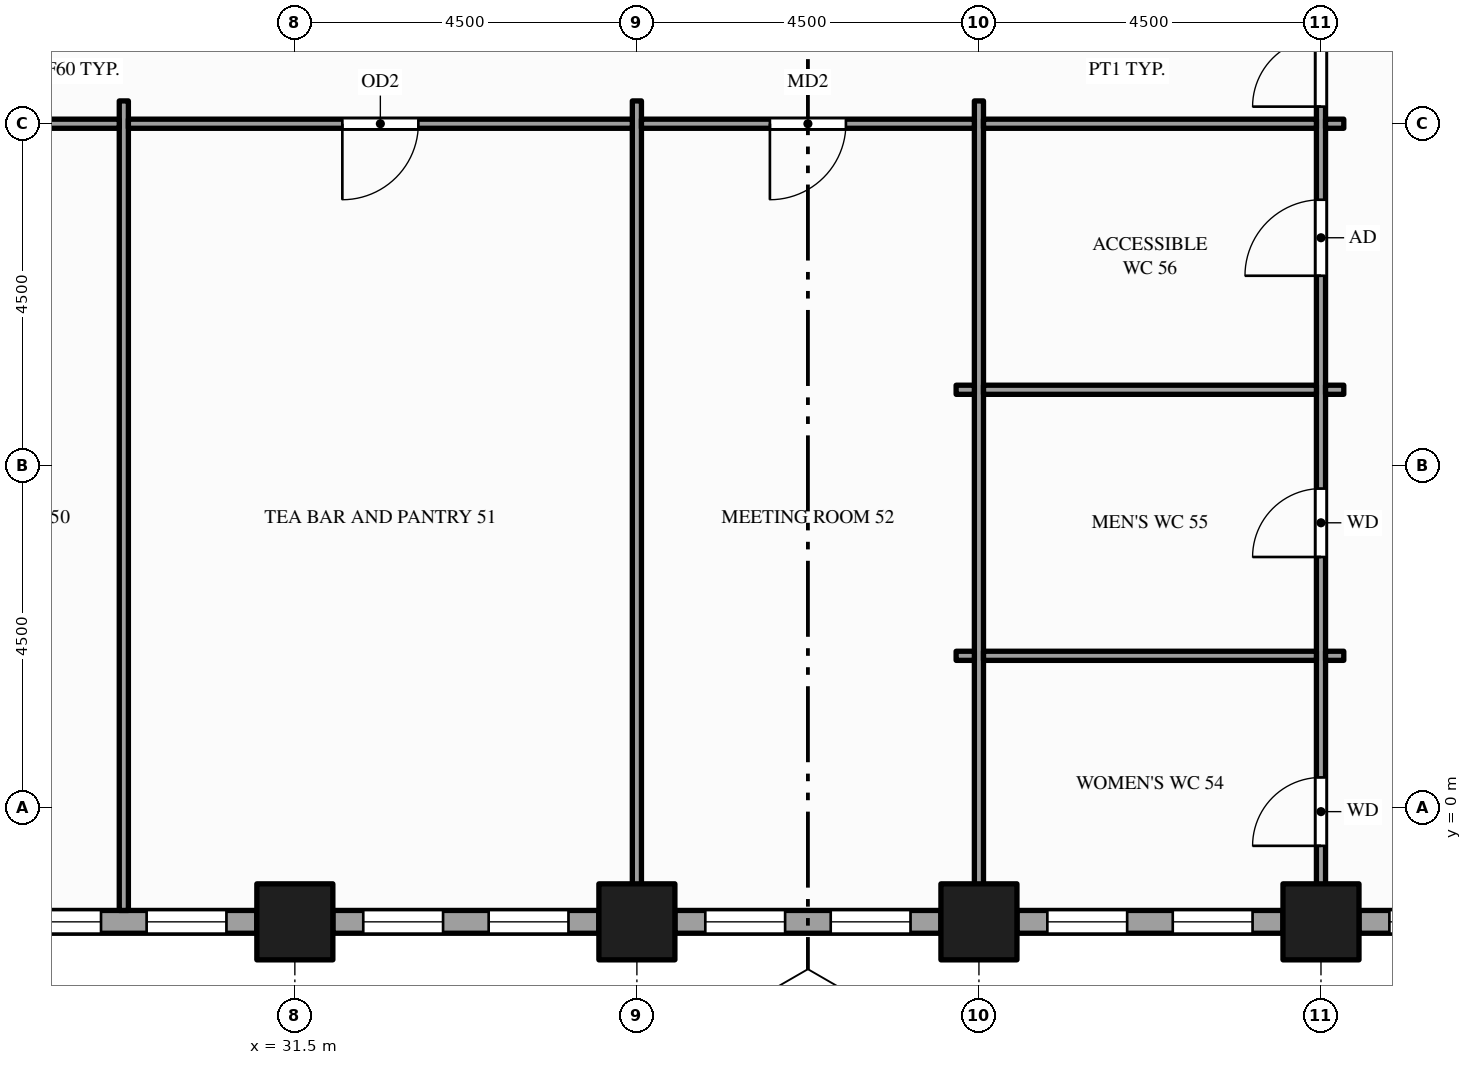
"""IFC4 building model, lengths in metres.
Left out: names, types, materials, properties, quantities, classifications, styles, units other than length and angle.
Written with IfcOpenShell. Run it as: python <this file> out.ifc"""

import sys

from ifc_helpers import new_model, si_unit, direction, frame, frame_2d, origin, origin_2d, place, context, subcontext, project, spatial, rectangle, hollow_rectangle, extrude, element, fill, save


model = new_model("IFC4")
c1 = context("Model", 3, precision=1e-05, world=origin(), true_north=direction((0.0, 1.0)))
c2 = subcontext(c1, "Body", "Model", "MODEL_VIEW")
j1 = project(units=[si_unit("LENGTHUNIT", "METRE"), si_unit("PLANEANGLEUNIT", "RADIAN")], contexts=[c1])
p1 = place(None, origin())
s1 = spatial("IfcSite", under=j1, at=p1, CompositionType="ELEMENT")
p2 = place(p1, origin())
s2 = spatial("IfcBuilding", under=s1, at=p2, CompositionType="ELEMENT")
p3 = place(p2, frame((0.0, 0.0, 115.0)))
s3 = spatial("IfcBuildingStorey", under=s2, at=p3, CompositionType="ELEMENT", Elevation=115.0)
for number, where, z_axis, x_axis in (
    (1, (31.5, -1.5, -0.15), (0.0, 0.0, 1.0), (1.0, 0.0, 0.0)),
    (2, (36.0, -1.5, -0.15), (0.0, 0.0, 1.0), (1.0, 0.0, 0.0)),
    (3, (40.5, -1.5, -0.15), (0.0, 0.0, 1.0), (1.0, 0.0, 0.0)),
    (4, (45.0, -1.5, -0.15), (0.0, 0.0, 1.0), (1.0, 0.0, 0.0)),
):
    element("IfcColumn", number, at=place(p3, frame(where, z_axis=z_axis, x_axis=x_axis)), inside=s3, PredefinedType="COLUMN", context=c2, shape_type="SweptSolid", body=[
        extrude(hollow_rectangle(XDim=1.0, YDim=1.0, WallThickness=0.05, at=origin_2d()), origin(), (0.0, 0.0, 1.0), 4.0),
    ])
p4 = place(p3, frame((27.5, -1.5, 0.0), z_axis=(0.0, 0.0, 1.0), x_axis=(1.0, 0.0, 0.0)))
e5 = element("IfcWall", 5, at=p4, inside=s3, PredefinedType="STANDARD", context=c2, shape_type="SweptSolid", body=[
    extrude(rectangle(XDim=3.5, YDim=0.3, at=frame_2d((1.75, 0.0))), origin(), (0.0, 0.0, 1.0), 3.154),
])
p5 = place(p4, frame((0.4, 0.0, 0.9)))
e6 = element("IfcOpeningElement", 6, at=p5, cuts=e5, PredefinedType="OPENING", context=c2, shape_type="SweptSolid", body=[
    extrude(rectangle(XDim=1.05, YDim=2.0, at=frame_2d((0.525, 1.0))), frame((0.0, 0.16, 0.0), z_axis=(0.0, -1.0, 0.0), x_axis=(1.0, 0.0, 0.0)), (0.0, 0.0, 1.0), 0.32),
])
p6 = place(p4, frame((2.05, 0.0, 0.9)))
e7 = element("IfcOpeningElement", 7, at=p6, cuts=e5, PredefinedType="OPENING", context=c2, shape_type="SweptSolid", body=[
    extrude(rectangle(XDim=1.05, YDim=2.0, at=frame_2d((0.525, 1.0))), frame((0.0, 0.16, 0.0), z_axis=(0.0, -1.0, 0.0), x_axis=(1.0, 0.0, 0.0)), (0.0, 0.0, 1.0), 0.32),
])
p7 = place(p3, frame((32.0, -1.5, 0.0), z_axis=(0.0, 0.0, 1.0), x_axis=(1.0, 0.0, 0.0)))
e8 = element("IfcWall", 8, at=p7, inside=s3, PredefinedType="STANDARD", context=c2, shape_type="SweptSolid", body=[
    extrude(rectangle(XDim=3.5, YDim=0.3, at=frame_2d((1.75, 0.0))), origin(), (0.0, 0.0, 1.0), 3.154),
])
p8 = place(p7, frame((0.4, 0.0, 0.9)))
e9 = element("IfcOpeningElement", 9, at=p8, cuts=e8, PredefinedType="OPENING", context=c2, shape_type="SweptSolid", body=[
    extrude(rectangle(XDim=1.05, YDim=2.0, at=frame_2d((0.525, 1.0))), frame((0.0, 0.16, 0.0), z_axis=(0.0, -1.0, 0.0), x_axis=(1.0, 0.0, 0.0)), (0.0, 0.0, 1.0), 0.32),
])
p9 = place(p7, frame((2.05, 0.0, 0.9)))
e10 = element("IfcOpeningElement", 10, at=p9, cuts=e8, PredefinedType="OPENING", context=c2, shape_type="SweptSolid", body=[
    extrude(rectangle(XDim=1.05, YDim=2.0, at=frame_2d((0.525, 1.0))), frame((0.0, 0.16, 0.0), z_axis=(0.0, -1.0, 0.0), x_axis=(1.0, 0.0, 0.0)), (0.0, 0.0, 1.0), 0.32),
])
p10 = place(p3, frame((36.5, -1.5, 0.0), z_axis=(0.0, 0.0, 1.0), x_axis=(1.0, 0.0, 0.0)))
e11 = element("IfcWall", 11, at=p10, inside=s3, PredefinedType="STANDARD", context=c2, shape_type="SweptSolid", body=[
    extrude(rectangle(XDim=3.5, YDim=0.3, at=frame_2d((1.75, 0.0))), origin(), (0.0, 0.0, 1.0), 3.154),
])
p11 = place(p10, frame((0.4, 0.0, 0.9)))
e12 = element("IfcOpeningElement", 12, at=p11, cuts=e11, PredefinedType="OPENING", context=c2, shape_type="SweptSolid", body=[
    extrude(rectangle(XDim=1.05, YDim=2.0, at=frame_2d((0.525, 1.0))), frame((0.0, 0.16, 0.0), z_axis=(0.0, -1.0, 0.0), x_axis=(1.0, 0.0, 0.0)), (0.0, 0.0, 1.0), 0.32),
])
p12 = place(p10, frame((2.05, 0.0, 0.9)))
e13 = element("IfcOpeningElement", 13, at=p12, cuts=e11, PredefinedType="OPENING", context=c2, shape_type="SweptSolid", body=[
    extrude(rectangle(XDim=1.05, YDim=2.0, at=frame_2d((0.525, 1.0))), frame((0.0, 0.16, 0.0), z_axis=(0.0, -1.0, 0.0), x_axis=(1.0, 0.0, 0.0)), (0.0, 0.0, 1.0), 0.32),
])
p13 = place(p3, frame((41.0, -1.5, 0.0), z_axis=(0.0, 0.0, 1.0), x_axis=(1.0, 0.0, 0.0)))
e14 = element("IfcWall", 14, at=p13, inside=s3, PredefinedType="STANDARD", context=c2, shape_type="SweptSolid", body=[
    extrude(rectangle(XDim=3.5, YDim=0.3, at=frame_2d((1.75, 0.0))), origin(), (0.0, 0.0, 1.0), 3.154),
])
p14 = place(p13, frame((0.4, 0.0, 0.9)))
e15 = element("IfcOpeningElement", 15, at=p14, cuts=e14, PredefinedType="OPENING", context=c2, shape_type="SweptSolid", body=[
    extrude(rectangle(XDim=1.05, YDim=2.0, at=frame_2d((0.525, 1.0))), frame((0.0, 0.16, 0.0), z_axis=(0.0, -1.0, 0.0), x_axis=(1.0, 0.0, 0.0)), (0.0, 0.0, 1.0), 0.32),
])
p15 = place(p13, frame((2.05, 0.0, 0.9)))
e16 = element("IfcOpeningElement", 16, at=p15, cuts=e14, PredefinedType="OPENING", context=c2, shape_type="SweptSolid", body=[
    extrude(rectangle(XDim=1.05, YDim=2.0, at=frame_2d((0.525, 1.0))), frame((0.0, 0.16, 0.0), z_axis=(0.0, -1.0, 0.0), x_axis=(1.0, 0.0, 0.0)), (0.0, 0.0, 1.0), 0.32),
])
p16 = place(p3, frame((45.5, -1.5, 0.0), z_axis=(0.0, 0.0, 1.0), x_axis=(1.0, 0.0, 0.0)))
e17 = element("IfcWall", 17, at=p16, inside=s3, PredefinedType="STANDARD", context=c2, shape_type="SweptSolid", body=[
    extrude(rectangle(XDim=3.5, YDim=0.3, at=frame_2d((1.75, 0.0))), origin(), (0.0, 0.0, 1.0), 3.154),
])
p17 = place(p16, frame((0.4, 0.0, 0.9)))
e18 = element("IfcOpeningElement", 18, at=p17, cuts=e17, PredefinedType="OPENING", context=c2, shape_type="SweptSolid", body=[
    extrude(rectangle(XDim=1.05, YDim=2.0, at=frame_2d((0.525, 1.0))), frame((0.0, 0.16, 0.0), z_axis=(0.0, -1.0, 0.0), x_axis=(1.0, 0.0, 0.0)), (0.0, 0.0, 1.0), 0.32),
])
p18 = place(p16, frame((2.05, 0.0, 0.9)))
e19 = element("IfcOpeningElement", 19, at=p18, cuts=e17, PredefinedType="OPENING", context=c2, shape_type="SweptSolid", body=[
    extrude(rectangle(XDim=1.05, YDim=2.0, at=frame_2d((0.525, 1.0))), frame((0.0, 0.16, 0.0), z_axis=(0.0, -1.0, 0.0), x_axis=(1.0, 0.0, 0.0)), (0.0, 0.0, 1.0), 0.32),
])
for number, where, z_axis, x_axis in (
    (20, (29.25, -1.35, 0.0), (0.0, 0.0, 1.0), (0.0, 1.0, 0.0)),
    (21, (36.0, -1.35, 0.0), (0.0, 0.0, 1.0), (0.0, 1.0, 0.0)),
    (22, (40.5, -1.35, 0.0), (0.0, 0.0, 1.0), (0.0, 1.0, 0.0)),
):
    element("IfcWall", number, at=place(p3, frame(where, z_axis=z_axis, x_axis=x_axis)), inside=s3, PredefinedType="PARTITIONING", context=c2, shape_type="SweptSolid", body=[
        extrude(rectangle(XDim=10.65, YDim=0.12, at=frame_2d((5.325, 0.0))), origin(), (0.0, 0.0, 1.0), 2.938),
    ])
p19 = place(p3, frame((45.0, -1.35, 0.0), z_axis=(0.0, 0.0, 1.0), x_axis=(0.0, 1.0, 0.0)))
e23 = element("IfcWall", 23, at=p19, inside=s3, PredefinedType="PARTITIONING", context=c2, shape_type="SweptSolid", body=[
    extrude(rectangle(XDim=22.2, YDim=0.12, at=frame_2d((11.1, 0.0))), origin(), (0.0, 0.0, 1.0), 2.938),
])
p20 = place(p19, frame((10.575, 0.0, 0.0)))
e24 = element("IfcOpeningElement", 24, at=p20, cuts=e23, PredefinedType="OPENING", context=c2, shape_type="SweptSolid", body=[
    extrude(rectangle(XDim=1.8, YDim=2.1, at=frame_2d((0.9, 1.05))), frame((0.0, 0.07, 0.0), z_axis=(0.0, -1.0, 0.0), x_axis=(1.0, 0.0, 0.0)), (0.0, 0.0, 1.0), 0.14),
])
p21 = place(p19, frame((0.85, 0.0, 0.0)))
e25 = element("IfcOpeningElement", 25, at=p21, cuts=e23, PredefinedType="OPENING", context=c2, shape_type="SweptSolid", body=[
    extrude(rectangle(XDim=0.9, YDim=2.1, at=frame_2d((0.45, 1.05))), frame((0.0, 0.07, 0.0), z_axis=(0.0, -1.0, 0.0), x_axis=(1.0, 0.0, 0.0)), (0.0, 0.0, 1.0), 0.14),
])
p22 = place(p19, frame((4.65, 0.0, 0.0)))
e26 = element("IfcOpeningElement", 26, at=p22, cuts=e23, PredefinedType="OPENING", context=c2, shape_type="SweptSolid", body=[
    extrude(rectangle(XDim=0.9, YDim=2.1, at=frame_2d((0.45, 1.05))), frame((0.0, 0.07, 0.0), z_axis=(0.0, -1.0, 0.0), x_axis=(1.0, 0.0, 0.0)), (0.0, 0.0, 1.0), 0.14),
])
p23 = place(p19, frame((8.35, 0.0, 0.0)))
e27 = element("IfcOpeningElement", 27, at=p23, cuts=e23, PredefinedType="OPENING", context=c2, shape_type="SweptSolid", body=[
    extrude(rectangle(XDim=1.0, YDim=2.1, at=frame_2d((0.5, 1.05))), frame((0.0, 0.07, 0.0), z_axis=(0.0, -1.0, 0.0), x_axis=(1.0, 0.0, 0.0)), (0.0, 0.0, 1.0), 0.14),
])
p24 = place(p3, frame((40.2, 2.0, 0.0), z_axis=(0.0, 0.0, 1.0), x_axis=(1.0, 0.0, 0.0)))
e28 = element("IfcWall", 28, at=p24, inside=s3, PredefinedType="PARTITIONING", context=c2, shape_type="SweptSolid", body=[
    extrude(rectangle(XDim=0.24, YDim=0.12, at=frame_2d((0.12, 0.0))), origin(), (0.0, 0.0, 1.0), 2.938),
])
p25 = place(p3, frame((40.56, 2.0, 0.0), z_axis=(0.0, 0.0, 1.0), x_axis=(1.0, 0.0, 0.0)))
e29 = element("IfcWall", 29, at=p25, inside=s3, PredefinedType="PARTITIONING", context=c2, shape_type="SweptSolid", body=[
    extrude(rectangle(XDim=4.38, YDim=0.12, at=frame_2d((2.19, 0.0))), origin(), (0.0, 0.0, 1.0), 2.938),
])
for number, where, z_axis, x_axis in (
    (30, (45.06, 2.0, 0.0), (0.0, 0.0, 1.0), (1.0, 0.0, 0.0)),
    (31, (40.2, 5.5, 0.0), (0.0, 0.0, 1.0), (1.0, 0.0, 0.0)),
):
    element("IfcWall", number, at=place(p3, frame(where, z_axis=z_axis, x_axis=x_axis)), inside=s3, PredefinedType="PARTITIONING", context=c2, shape_type="SweptSolid", body=[
        extrude(rectangle(XDim=0.24, YDim=0.12, at=frame_2d((0.12, 0.0))), origin(), (0.0, 0.0, 1.0), 2.938),
    ])
p26 = place(p3, frame((40.56, 5.5, 0.0), z_axis=(0.0, 0.0, 1.0), x_axis=(1.0, 0.0, 0.0)))
e32 = element("IfcWall", 32, at=p26, inside=s3, PredefinedType="PARTITIONING", context=c2, shape_type="SweptSolid", body=[
    extrude(rectangle(XDim=4.38, YDim=0.12, at=frame_2d((2.19, 0.0))), origin(), (0.0, 0.0, 1.0), 2.938),
])
p27 = place(p3, frame((45.06, 5.5, 0.0), z_axis=(0.0, 0.0, 1.0), x_axis=(1.0, 0.0, 0.0)))
e33 = element("IfcWall", 33, at=p27, inside=s3, PredefinedType="PARTITIONING", context=c2, shape_type="SweptSolid", body=[
    extrude(rectangle(XDim=0.24, YDim=0.12, at=frame_2d((0.12, 0.0))), origin(), (0.0, 0.0, 1.0), 2.938),
])
p28 = place(p3, frame((24.81, 9.0, 0.0), z_axis=(0.0, 0.0, 1.0), x_axis=(1.0, 0.0, 0.0)))
e34 = element("IfcWall", 34, at=p28, inside=s3, PredefinedType="PARTITIONING", context=c2, shape_type="SweptSolid", body=[
    extrude(rectangle(XDim=4.38, YDim=0.12, at=frame_2d((2.19, 0.0))), origin(), (0.0, 0.0, 1.0), 2.76),
])
p29 = place(p28, frame((1.74, 0.0, 0.0)))
e35 = element("IfcOpeningElement", 35, at=p29, cuts=e34, PredefinedType="OPENING", context=c2, shape_type="SweptSolid", body=[
    extrude(rectangle(XDim=0.9, YDim=2.1, at=frame_2d((0.45, 1.05))), frame((0.0, 0.07, 0.0), z_axis=(0.0, -1.0, 0.0), x_axis=(1.0, 0.0, 0.0)), (0.0, 0.0, 1.0), 0.14),
])
p30 = place(p3, frame((29.31, 9.0, 0.0), z_axis=(0.0, 0.0, 1.0), x_axis=(1.0, 0.0, 0.0)))
e36 = element("IfcWall", 36, at=p30, inside=s3, PredefinedType="PARTITIONING", context=c2, shape_type="SweptSolid", body=[
    extrude(rectangle(XDim=6.63, YDim=0.12, at=frame_2d((3.315, 0.0))), origin(), (0.0, 0.0, 1.0), 2.938),
])
p31 = place(p30, frame((2.815, 0.0, 0.0)))
e37 = element("IfcOpeningElement", 37, at=p31, cuts=e36, PredefinedType="OPENING", context=c2, shape_type="SweptSolid", body=[
    extrude(rectangle(XDim=1.0, YDim=2.1, at=frame_2d((0.5, 1.05))), frame((0.0, 0.07, 0.0), z_axis=(0.0, -1.0, 0.0), x_axis=(1.0, 0.0, 0.0)), (0.0, 0.0, 1.0), 0.14),
])
p32 = place(p3, frame((36.06, 9.0, 0.0), z_axis=(0.0, 0.0, 1.0), x_axis=(1.0, 0.0, 0.0)))
e38 = element("IfcWall", 38, at=p32, inside=s3, PredefinedType="PARTITIONING", context=c2, shape_type="SweptSolid", body=[
    extrude(rectangle(XDim=4.38, YDim=0.12, at=frame_2d((2.19, 0.0))), origin(), (0.0, 0.0, 1.0), 2.938),
])
p33 = place(p32, frame((1.69, 0.0, 0.0)))
e39 = element("IfcOpeningElement", 39, at=p33, cuts=e38, PredefinedType="OPENING", context=c2, shape_type="SweptSolid", body=[
    extrude(rectangle(XDim=1.0, YDim=2.1, at=frame_2d((0.5, 1.05))), frame((0.0, 0.07, 0.0), z_axis=(0.0, -1.0, 0.0), x_axis=(1.0, 0.0, 0.0)), (0.0, 0.0, 1.0), 0.14),
])
p34 = place(p3, frame((40.56, 9.0, 0.0), z_axis=(0.0, 0.0, 1.0), x_axis=(1.0, 0.0, 0.0)))
e40 = element("IfcWall", 40, at=p34, inside=s3, PredefinedType="PARTITIONING", context=c2, shape_type="SweptSolid", body=[
    extrude(rectangle(XDim=4.38, YDim=0.12, at=frame_2d((2.19, 0.0))), origin(), (0.0, 0.0, 1.0), 2.938),
])
p35 = place(p3, frame((45.06, 9.0, 0.0), z_axis=(0.0, 0.0, 1.0), x_axis=(1.0, 0.0, 0.0)))
e41 = element("IfcWall", 41, at=p35, inside=s3, PredefinedType="PARTITIONING", context=c2, shape_type="SweptSolid", body=[
    extrude(rectangle(XDim=0.24, YDim=0.12, at=frame_2d((0.12, 0.0))), origin(), (0.0, 0.0, 1.0), 2.938),
])
p36 = place(p5, origin())
e42 = element("IfcWindow", 42, at=p36, inside=s3, PartitioningType="SINGLE_PANEL", PredefinedType="WINDOW", context=c2, shape_type="SweptSolid", body=[
    extrude(rectangle(XDim=1.05, YDim=2.0, at=frame_2d((0.525, 1.0))), frame((0.0, 0.03, 0.0), z_axis=(0.0, -1.0, 0.0), x_axis=(1.0, 0.0, 0.0)), (0.0, 0.0, 1.0), 0.06),
])
fill(e6, e42)
p37 = place(p6, origin())
e43 = element("IfcWindow", 43, at=p37, inside=s3, PartitioningType="SINGLE_PANEL", PredefinedType="WINDOW", context=c2, shape_type="SweptSolid", body=[
    extrude(rectangle(XDim=1.05, YDim=2.0, at=frame_2d((0.525, 1.0))), frame((0.0, 0.03, 0.0), z_axis=(0.0, -1.0, 0.0), x_axis=(1.0, 0.0, 0.0)), (0.0, 0.0, 1.0), 0.06),
])
fill(e7, e43)
p38 = place(p8, origin())
e44 = element("IfcWindow", 44, at=p38, inside=s3, PartitioningType="SINGLE_PANEL", PredefinedType="WINDOW", context=c2, shape_type="SweptSolid", body=[
    extrude(rectangle(XDim=1.05, YDim=2.0, at=frame_2d((0.525, 1.0))), frame((0.0, 0.03, 0.0), z_axis=(0.0, -1.0, 0.0), x_axis=(1.0, 0.0, 0.0)), (0.0, 0.0, 1.0), 0.06),
])
fill(e9, e44)
p39 = place(p9, origin())
e45 = element("IfcWindow", 45, at=p39, inside=s3, PartitioningType="SINGLE_PANEL", PredefinedType="WINDOW", context=c2, shape_type="SweptSolid", body=[
    extrude(rectangle(XDim=1.05, YDim=2.0, at=frame_2d((0.525, 1.0))), frame((0.0, 0.03, 0.0), z_axis=(0.0, -1.0, 0.0), x_axis=(1.0, 0.0, 0.0)), (0.0, 0.0, 1.0), 0.06),
])
fill(e10, e45)
p40 = place(p11, origin())
e46 = element("IfcWindow", 46, at=p40, inside=s3, PartitioningType="SINGLE_PANEL", PredefinedType="WINDOW", context=c2, shape_type="SweptSolid", body=[
    extrude(rectangle(XDim=1.05, YDim=2.0, at=frame_2d((0.525, 1.0))), frame((0.0, 0.03, 0.0), z_axis=(0.0, -1.0, 0.0), x_axis=(1.0, 0.0, 0.0)), (0.0, 0.0, 1.0), 0.06),
])
fill(e12, e46)
p41 = place(p12, origin())
e47 = element("IfcWindow", 47, at=p41, inside=s3, PartitioningType="SINGLE_PANEL", PredefinedType="WINDOW", context=c2, shape_type="SweptSolid", body=[
    extrude(rectangle(XDim=1.05, YDim=2.0, at=frame_2d((0.525, 1.0))), frame((0.0, 0.03, 0.0), z_axis=(0.0, -1.0, 0.0), x_axis=(1.0, 0.0, 0.0)), (0.0, 0.0, 1.0), 0.06),
])
fill(e13, e47)
p42 = place(p14, origin())
e48 = element("IfcWindow", 48, at=p42, inside=s3, PartitioningType="SINGLE_PANEL", PredefinedType="WINDOW", context=c2, shape_type="SweptSolid", body=[
    extrude(rectangle(XDim=1.05, YDim=2.0, at=frame_2d((0.525, 1.0))), frame((0.0, 0.03, 0.0), z_axis=(0.0, -1.0, 0.0), x_axis=(1.0, 0.0, 0.0)), (0.0, 0.0, 1.0), 0.06),
])
fill(e15, e48)
p43 = place(p15, origin())
e49 = element("IfcWindow", 49, at=p43, inside=s3, PartitioningType="SINGLE_PANEL", PredefinedType="WINDOW", context=c2, shape_type="SweptSolid", body=[
    extrude(rectangle(XDim=1.05, YDim=2.0, at=frame_2d((0.525, 1.0))), frame((0.0, 0.03, 0.0), z_axis=(0.0, -1.0, 0.0), x_axis=(1.0, 0.0, 0.0)), (0.0, 0.0, 1.0), 0.06),
])
fill(e16, e49)
p44 = place(p17, origin())
e50 = element("IfcWindow", 50, at=p44, inside=s3, PartitioningType="SINGLE_PANEL", PredefinedType="WINDOW", context=c2, shape_type="SweptSolid", body=[
    extrude(rectangle(XDim=1.05, YDim=2.0, at=frame_2d((0.525, 1.0))), frame((0.0, 0.03, 0.0), z_axis=(0.0, -1.0, 0.0), x_axis=(1.0, 0.0, 0.0)), (0.0, 0.0, 1.0), 0.06),
])
fill(e18, e50)
p45 = place(p20, origin())
e51 = element("IfcDoor", 51, at=p45, inside=s3, OperationType="DOUBLE_DOOR_SINGLE_SWING", PredefinedType="DOOR", context=c2, shape_type="SweptSolid", body=[
    extrude(rectangle(XDim=1.8, YDim=2.1, at=frame_2d((0.9, 1.05))), frame((0.0, 0.025, 0.0), z_axis=(0.0, -1.0, 0.0), x_axis=(1.0, 0.0, 0.0)), (0.0, 0.0, 1.0), 0.05),
])
fill(e24, e51)
p46 = place(p31, origin())
e52 = element("IfcDoor", 52, at=p46, inside=s3, OperationType="SINGLE_SWING_LEFT", PredefinedType="DOOR", context=c2, shape_type="SweptSolid", body=[
    extrude(rectangle(XDim=1.0, YDim=2.1, at=frame_2d((0.5, 1.05))), frame((0.0, 0.025, 0.0), z_axis=(0.0, -1.0, 0.0), x_axis=(1.0, 0.0, 0.0)), (0.0, 0.0, 1.0), 0.05),
])
fill(e37, e52)
p47 = place(p33, origin())
e53 = element("IfcDoor", 53, at=p47, inside=s3, OperationType="SINGLE_SWING_LEFT", PredefinedType="DOOR", context=c2, shape_type="SweptSolid", body=[
    extrude(rectangle(XDim=1.0, YDim=2.1, at=frame_2d((0.5, 1.05))), frame((0.0, 0.025, 0.0), z_axis=(0.0, -1.0, 0.0), x_axis=(1.0, 0.0, 0.0)), (0.0, 0.0, 1.0), 0.05),
])
fill(e39, e53)
p48 = place(p21, origin())
e54 = element("IfcDoor", 54, at=p48, inside=s3, OperationType="SINGLE_SWING_LEFT", PredefinedType="DOOR", context=c2, shape_type="SweptSolid", body=[
    extrude(rectangle(XDim=0.9, YDim=2.1, at=frame_2d((0.45, 1.05))), frame((0.0, 0.025, 0.0), z_axis=(0.0, -1.0, 0.0), x_axis=(1.0, 0.0, 0.0)), (0.0, 0.0, 1.0), 0.05),
])
fill(e25, e54)
p49 = place(p22, origin())
e55 = element("IfcDoor", 55, at=p49, inside=s3, OperationType="SINGLE_SWING_LEFT", PredefinedType="DOOR", context=c2, shape_type="SweptSolid", body=[
    extrude(rectangle(XDim=0.9, YDim=2.1, at=frame_2d((0.45, 1.05))), frame((0.0, 0.025, 0.0), z_axis=(0.0, -1.0, 0.0), x_axis=(1.0, 0.0, 0.0)), (0.0, 0.0, 1.0), 0.05),
])
fill(e26, e55)
p50 = place(p23, origin())
e56 = element("IfcDoor", 56, at=p50, inside=s3, OperationType="SINGLE_SWING_LEFT", PredefinedType="DOOR", context=c2, shape_type="SweptSolid", body=[
    extrude(rectangle(XDim=1.0, YDim=2.1, at=frame_2d((0.5, 1.05))), frame((0.0, 0.025, 0.0), z_axis=(0.0, -1.0, 0.0), x_axis=(1.0, 0.0, 0.0)), (0.0, 0.0, 1.0), 0.05),
])
fill(e27, e56)
save(model, sys.argv[1])
